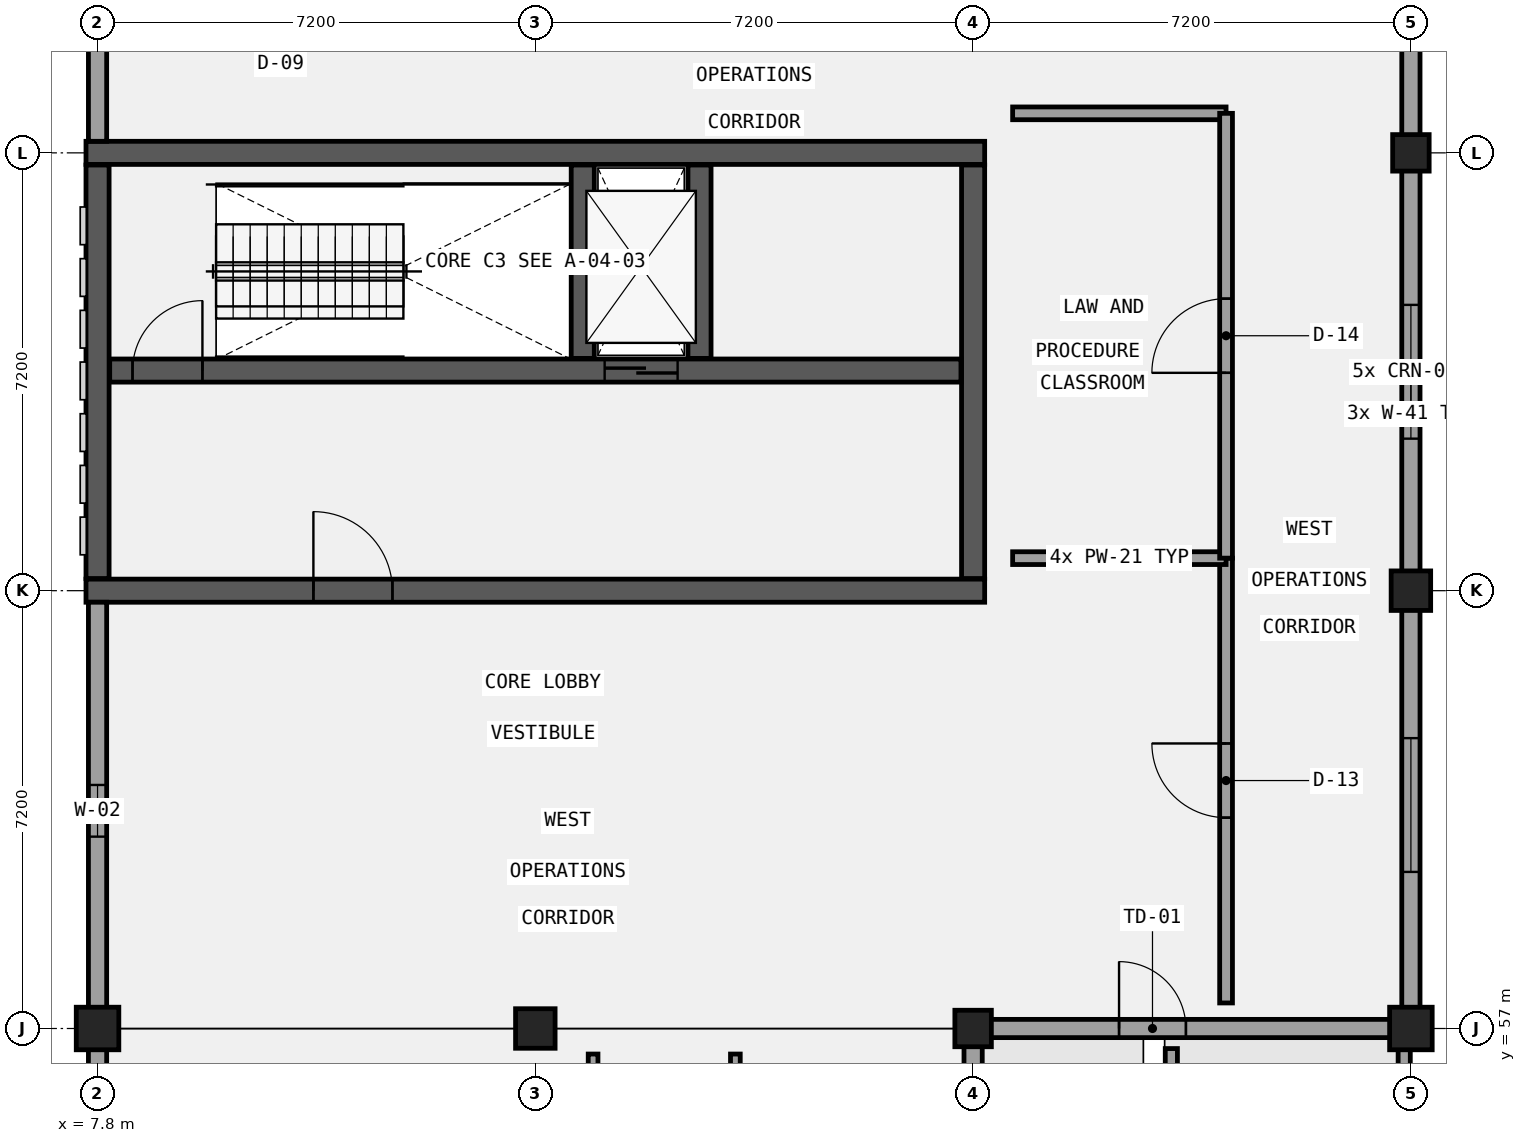
"""IFC4 building model, lengths in metres.
Left out: names, types, materials, properties, quantities, classifications, styles, units other than length and angle.
Written with IfcOpenShell. Run it as: python <this file> out.ifc"""

import sys

from ifc_helpers import new_model, si_unit, direction, frame, frame_2d, origin, origin_2d, place, context, subcontext, project, spatial, rectangle, extrude, element, fill, save


model = new_model("IFC4")
c1 = context("Model", 3, precision=1e-05, world=origin(), true_north=direction((0.0, 1.0)))
c2 = subcontext(c1, "Body", "Model", "MODEL_VIEW")
j1 = project(units=[si_unit("LENGTHUNIT", "METRE"), si_unit("PLANEANGLEUNIT", "RADIAN")], contexts=[c1])
p1 = place(None, origin())
s1 = spatial("IfcSite", under=j1, at=p1, CompositionType="ELEMENT")
p2 = place(p1, origin())
s2 = spatial("IfcBuilding", under=s1, at=p2, CompositionType="ELEMENT")
p3 = place(p2, frame((0.0, 0.0, 13.8)))
s3 = spatial("IfcBuildingStorey", under=s2, at=p3, CompositionType="ELEMENT", Elevation=13.8)
p4 = place(p3, frame((7.61, 71.4, 0.0), z_axis=(0.0, 0.0, 1.0), x_axis=(1.0, 0.0, 0.0)))
e1 = element("IfcWall", 1, at=p4, inside=s3, PredefinedType="SHEAR", context=c2, shape_type="SweptSolid", body=[
    extrude(rectangle(XDim=14.78, YDim=0.38, at=frame_2d((7.39, 0.0))), origin(), (0.0, 0.0, 1.0), 4.2),
])
p5 = place(p3, frame((7.61, 64.2, 0.0), z_axis=(0.0, 0.0, 1.0), x_axis=(1.0, 0.0, 0.0)))
e2 = element("IfcWall", 2, at=p5, inside=s3, PredefinedType="SHEAR", context=c2, shape_type="SweptSolid", body=[
    extrude(rectangle(XDim=14.78, YDim=0.38, at=frame_2d((7.39, 0.0))), origin(), (0.0, 0.0, 1.0), 4.2),
])
p6 = place(p5, frame((3.74, 0.0, 0.0)))
e3 = element("IfcOpeningElement", 3, at=p6, cuts=e2, PredefinedType="OPENING", context=c2, shape_type="SweptSolid", body=[
    extrude(rectangle(XDim=1.3, YDim=2.2, at=frame_2d((0.65, 1.1))), frame((0.0, 0.2, 0.0), z_axis=(0.0, -1.0, 0.0), x_axis=(1.0, 0.0, 0.0)), (0.0, 0.0, 1.0), 0.4),
])
for number, where, z_axis, x_axis in (
    (4, (7.8, 64.4, 0.0), (0.0, 0.0, 1.0), (0.0, 1.0, 0.0)),
    (5, (22.2, 64.4, 0.0), (0.0, 0.0, 1.0), (0.0, 1.0, 0.0)),
):
    element("IfcWall", number, at=place(p3, frame(where, z_axis=z_axis, x_axis=x_axis)), inside=s3, PredefinedType="SHEAR", context=c2, shape_type="SweptSolid", body=[
        extrude(rectangle(XDim=6.8, YDim=0.38, at=frame_2d((3.4, 0.0))), origin(), (0.0, 0.0, 1.0), 4.2),
    ])
p7 = place(p3, frame((8.0, 67.82, 0.0), z_axis=(0.0, 0.0, 1.0), x_axis=(1.0, 0.0, 0.0)))
e6 = element("IfcWall", 6, at=p7, inside=s3, PredefinedType="SHEAR", context=c2, shape_type="SweptSolid", body=[
    extrude(rectangle(XDim=14.0, YDim=0.38, at=frame_2d((7.0, 0.0))), origin(), (0.0, 0.0, 1.0), 4.2),
])
p8 = place(p7, frame((8.14, 0.0, 0.0)))
e7 = element("IfcOpeningElement", 7, at=p8, cuts=e6, PredefinedType="OPENING", context=c2, shape_type="SweptSolid", body=[
    extrude(rectangle(XDim=1.2, YDim=2.15, at=frame_2d((0.6, 1.075))), frame((0.0, 0.2, 0.0), z_axis=(0.0, -1.0, 0.0), x_axis=(1.0, 0.0, 0.0)), (0.0, 0.0, 1.0), 0.4),
])
p9 = place(p7, frame((0.375, 0.0, 0.0)))
e8 = element("IfcOpeningElement", 8, at=p9, cuts=e6, PredefinedType="OPENING", context=c2, shape_type="SweptSolid", body=[
    extrude(rectangle(XDim=1.15, YDim=2.15, at=frame_2d((0.575, 1.075))), frame((0.0, 0.2, 0.0), z_axis=(0.0, -1.0, 0.0), x_axis=(1.0, 0.0, 0.0)), (0.0, 0.0, 1.0), 0.4),
])
for number, where, z_axis, x_axis in (
    (9, (15.78, 68.02, 0.0), (0.0, 0.0, 1.0), (0.0, 1.0, 0.0)),
    (10, (17.7, 68.02, 0.0), (0.0, 0.0, 1.0), (0.0, 1.0, 0.0)),
):
    element("IfcWall", number, at=place(p3, frame(where, z_axis=z_axis, x_axis=x_axis)), inside=s3, PredefinedType="SHEAR", context=c2, shape_type="SweptSolid", body=[
        extrude(rectangle(XDim=3.18, YDim=0.38, at=frame_2d((1.59, 0.0))), origin(), (0.0, 0.0, 1.0), 4.2),
    ])
p10 = place(p3, frame((7.8, 57.0, 0.0), z_axis=(0.0, 0.0, 1.0), x_axis=(1.0, 0.0, 0.0)))
e11 = element("IfcColumn", 11, at=p10, inside=s3, PredefinedType="COLUMN", context=c2, shape_type="SweptSolid", body=[
    extrude(rectangle(XDim=0.7, YDim=0.7, at=origin_2d()), origin(), (0.0, 0.0, 1.0), 4.2),
])
p11 = place(p3, frame((15.0, 57.0, 0.0), z_axis=(0.0, 0.0, 1.0), x_axis=(1.0, 0.0, 0.0)))
e12 = element("IfcColumn", 12, at=p11, inside=s3, PredefinedType="COLUMN", context=c2, shape_type="SweptSolid", body=[
    extrude(rectangle(XDim=0.65, YDim=0.65, at=origin_2d()), origin(), (0.0, 0.0, 1.0), 4.2),
])
p12 = place(p3, frame((22.2, 57.0, 0.0), z_axis=(0.0, 0.0, 1.0), x_axis=(1.0, 0.0, 0.0)))
e13 = element("IfcColumn", 13, at=p12, inside=s3, PredefinedType="COLUMN", context=c2, shape_type="SweptSolid", body=[
    extrude(rectangle(XDim=0.6, YDim=0.6, at=origin_2d()), origin(), (0.0, 0.0, 1.0), 4.2),
])
p13 = place(p3, frame((29.4, 57.0, 0.0), z_axis=(0.0, 0.0, 1.0), x_axis=(1.0, 0.0, 0.0)))
e14 = element("IfcColumn", 14, at=p13, inside=s3, PredefinedType="COLUMN", context=c2, shape_type="SweptSolid", body=[
    extrude(rectangle(XDim=0.7, YDim=0.7, at=origin_2d()), origin(), (0.0, 0.0, 1.0), 4.2),
])
p14 = place(p3, frame((29.4, 64.2, 0.0), z_axis=(0.0, 0.0, 1.0), x_axis=(1.0, 0.0, 0.0)))
e15 = element("IfcColumn", 15, at=p14, inside=s3, PredefinedType="COLUMN", context=c2, shape_type="SweptSolid", body=[
    extrude(rectangle(XDim=0.65, YDim=0.65, at=origin_2d()), origin(), (0.0, 0.0, 1.0), 4.2),
])
p15 = place(p3, frame((29.4, 71.4, 0.0), z_axis=(0.0, 0.0, 1.0), x_axis=(1.0, 0.0, 0.0)))
e16 = element("IfcColumn", 16, at=p15, inside=s3, PredefinedType="COLUMN", context=c2, shape_type="SweptSolid", body=[
    extrude(rectangle(XDim=0.6, YDim=0.6, at=origin_2d()), origin(), (0.0, 0.0, 1.0), 4.2),
])
p16 = place(p3, frame((22.2, 28.35, 0.0), z_axis=(0.0, 0.0, 1.0), x_axis=(0.0, 1.0, 0.0)))
e17 = element("IfcWall", 17, at=p16, inside=s3, PredefinedType="SOLIDWALL", context=c2, shape_type="SweptSolid", body=[
    extrude(rectangle(XDim=28.5, YDim=0.3, at=frame_2d((14.25, 0.0))), origin(), (0.0, 0.0, 1.0), 2.94),
])
p17 = place(p16, frame((17.1, 0.0, 0.0)))
e18 = element("IfcOpeningElement", 18, at=p17, cuts=e17, PredefinedType="OPENING", context=c2, shape_type="SweptSolid", body=[
    extrude(rectangle(XDim=1.1, YDim=2.2, at=frame_2d((0.55, 1.1))), frame((0.0, 0.16, 0.0), z_axis=(0.0, -1.0, 0.0), x_axis=(1.0, 0.0, 0.0)), (0.0, 0.0, 1.0), 0.32),
])
p18 = place(p16, frame((2.95, 0.0, 1.0)))
e19 = element("IfcOpeningElement", 19, at=p18, cuts=e17, PredefinedType="OPENING", context=c2, shape_type="SweptSolid", body=[
    extrude(rectangle(XDim=1.15, YDim=1.4, at=frame_2d((0.575, 0.7))), frame((0.0, 0.16, 0.0), z_axis=(0.0, -1.0, 0.0), x_axis=(1.0, 0.0, 0.0)), (0.0, 0.0, 1.0), 0.32),
])
p19 = place(p16, frame((10.075, 0.0, 1.0)))
e20 = element("IfcOpeningElement", 20, at=p19, cuts=e17, PredefinedType="OPENING", context=c2, shape_type="SweptSolid", body=[
    extrude(rectangle(XDim=1.15, YDim=1.4, at=frame_2d((0.575, 0.7))), frame((0.0, 0.16, 0.0), z_axis=(0.0, -1.0, 0.0), x_axis=(1.0, 0.0, 0.0)), (0.0, 0.0, 1.0), 0.32),
])
p20 = place(p16, frame((24.4, 0.0, 1.0)))
e21 = element("IfcOpeningElement", 21, at=p20, cuts=e17, PredefinedType="OPENING", context=c2, shape_type="SweptSolid", body=[
    extrude(rectangle(XDim=1.15, YDim=1.4, at=frame_2d((0.575, 0.7))), frame((0.0, 0.16, 0.0), z_axis=(0.0, -1.0, 0.0), x_axis=(1.0, 0.0, 0.0)), (0.0, 0.0, 1.0), 0.32),
])
p21 = place(p3, frame((22.05, 57.0, 0.0), z_axis=(0.0, 0.0, 1.0), x_axis=(1.0, 0.0, 0.0)))
e22 = element("IfcWall", 22, at=p21, inside=s3, PredefinedType="SOLIDWALL", context=c2, shape_type="SweptSolid", body=[
    extrude(rectangle(XDim=7.5, YDim=0.3, at=frame_2d((3.75, 0.0))), origin(), (0.0, 0.0, 1.0), 3.04),
])
p22 = place(p21, frame((2.55, 0.0, 0.0)))
e23 = element("IfcOpeningElement", 23, at=p22, cuts=e22, PredefinedType="OPENING", context=c2, shape_type="SweptSolid", body=[
    extrude(rectangle(XDim=1.1, YDim=2.2, at=frame_2d((0.55, 1.1))), frame((0.0, 0.16, 0.0), z_axis=(0.0, -1.0, 0.0), x_axis=(1.0, 0.0, 0.0)), (0.0, 0.0, 1.0), 0.32),
])
p23 = place(p3, frame((29.4, 57.15, 0.0), z_axis=(0.0, 0.0, 1.0), x_axis=(0.0, 1.0, 0.0)))
e24 = element("IfcWall", 24, at=p23, inside=s3, PredefinedType="SOLIDWALL", context=c2, shape_type="SweptSolid", body=[
    extrude(rectangle(XDim=21.3, YDim=0.3, at=frame_2d((10.65, 0.0))), origin(), (0.0, 0.0, 1.0), 3.19),
])
p24 = place(p23, frame((2.425, 0.0, 1.0)))
e25 = element("IfcOpeningElement", 25, at=p24, cuts=e24, PredefinedType="OPENING", context=c2, shape_type="SweptSolid", body=[
    extrude(rectangle(XDim=2.2, YDim=1.4, at=frame_2d((1.1, 0.7))), frame((0.0, 0.16, 0.0), z_axis=(0.0, -1.0, 0.0), x_axis=(1.0, 0.0, 0.0)), (0.0, 0.0, 1.0), 0.32),
])
p25 = place(p23, frame((9.55, 0.0, 1.0)))
e26 = element("IfcOpeningElement", 26, at=p25, cuts=e24, PredefinedType="OPENING", context=c2, shape_type="SweptSolid", body=[
    extrude(rectangle(XDim=2.2, YDim=1.4, at=frame_2d((1.1, 0.7))), frame((0.0, 0.16, 0.0), z_axis=(0.0, -1.0, 0.0), x_axis=(1.0, 0.0, 0.0)), (0.0, 0.0, 1.0), 0.32),
])
p26 = place(p23, frame((16.675, 0.0, 1.0)))
e27 = element("IfcOpeningElement", 27, at=p26, cuts=e24, PredefinedType="OPENING", context=c2, shape_type="SweptSolid", body=[
    extrude(rectangle(XDim=2.2, YDim=1.4, at=frame_2d((1.1, 0.7))), frame((0.0, 0.16, 0.0), z_axis=(0.0, -1.0, 0.0), x_axis=(1.0, 0.0, 0.0)), (0.0, 0.0, 1.0), 0.32),
])
p27 = place(p3, frame((7.8, 78.45, 0.0), z_axis=(0.0, 0.0, 1.0), x_axis=(0.0, -1.0, 0.0)))
e28 = element("IfcWall", 28, at=p27, inside=s3, PredefinedType="SOLIDWALL", context=c2, shape_type="SweptSolid", body=[
    extrude(rectangle(XDim=6.86, YDim=0.3, at=frame_2d((3.43, 0.0))), origin(), (0.0, 0.0, 1.0), 3.34),
])
p28 = place(p27, frame((2.78, 0.0, 1.0)))
e29 = element("IfcOpeningElement", 29, at=p28, cuts=e28, PredefinedType="OPENING", context=c2, shape_type="SweptSolid", body=[
    extrude(rectangle(XDim=1.3, YDim=1.65, at=frame_2d((0.65, 0.825))), frame((0.0, 0.16, 0.0), z_axis=(0.0, -1.0, 0.0), x_axis=(1.0, 0.0, 0.0)), (0.0, 0.0, 1.0), 0.32),
])
p29 = place(p3, frame((7.8, 64.01, 0.0), z_axis=(0.0, 0.0, 1.0), x_axis=(0.0, -1.0, 0.0)))
e30 = element("IfcWall", 30, at=p29, inside=s3, PredefinedType="SOLIDWALL", context=c2, shape_type="SweptSolid", body=[
    extrude(rectangle(XDim=6.86, YDim=0.3, at=frame_2d((3.43, 0.0))), origin(), (0.0, 0.0, 1.0), 2.94),
])
p30 = place(p29, frame((3.005, 0.0, 1.0)))
e31 = element("IfcOpeningElement", 31, at=p30, cuts=e30, PredefinedType="OPENING", context=c2, shape_type="SweptSolid", body=[
    extrude(rectangle(XDim=0.85, YDim=1.65, at=frame_2d((0.425, 0.825))), frame((0.0, 0.16, 0.0), z_axis=(0.0, -1.0, 0.0), x_axis=(1.0, 0.0, 0.0)), (0.0, 0.0, 1.0), 0.32),
])
p31 = place(p3, frame((7.8, 56.85, 0.0), z_axis=(0.0, 0.0, 1.0), x_axis=(0.0, -1.0, 0.0)))
e32 = element("IfcWall", 32, at=p31, inside=s3, PredefinedType="SOLIDWALL", context=c2, shape_type="SweptSolid", body=[
    extrude(rectangle(XDim=28.5, YDim=0.3, at=frame_2d((14.25, 0.0))), origin(), (0.0, 0.0, 1.0), 3.04),
])
p32 = place(p31, frame((24.475, 0.0, 1.0)))
e33 = element("IfcOpeningElement", 33, at=p32, cuts=e32, PredefinedType="OPENING", context=c2, shape_type="SweptSolid", body=[
    extrude(rectangle(XDim=1.0, YDim=1.4, at=frame_2d((0.5, 0.7))), frame((0.0, 0.16, 0.0), z_axis=(0.0, -1.0, 0.0), x_axis=(1.0, 0.0, 0.0)), (0.0, 0.0, 1.0), 0.32),
])
p33 = place(p31, frame((17.35, 0.0, 1.0)))
e34 = element("IfcOpeningElement", 34, at=p33, cuts=e32, PredefinedType="OPENING", context=c2, shape_type="SweptSolid", body=[
    extrude(rectangle(XDim=1.0, YDim=1.4, at=frame_2d((0.5, 0.7))), frame((0.0, 0.16, 0.0), z_axis=(0.0, -1.0, 0.0), x_axis=(1.0, 0.0, 0.0)), (0.0, 0.0, 1.0), 0.32),
])
p34 = place(p31, frame((10.15, 0.0, 1.0)))
e35 = element("IfcOpeningElement", 35, at=p34, cuts=e32, PredefinedType="OPENING", context=c2, shape_type="SweptSolid", body=[
    extrude(rectangle(XDim=1.0, YDim=1.4, at=frame_2d((0.5, 0.7))), frame((0.0, 0.16, 0.0), z_axis=(0.0, -1.0, 0.0), x_axis=(1.0, 0.0, 0.0)), (0.0, 0.0, 1.0), 0.32),
])
p35 = place(p31, frame((3.025, 0.0, 1.0)))
e36 = element("IfcOpeningElement", 36, at=p35, cuts=e32, PredefinedType="OPENING", context=c2, shape_type="SweptSolid", body=[
    extrude(rectangle(XDim=1.0, YDim=1.4, at=frame_2d((0.5, 0.7))), frame((0.0, 0.16, 0.0), z_axis=(0.0, -1.0, 0.0), x_axis=(1.0, 0.0, 0.0)), (0.0, 0.0, 1.0), 0.32),
])
for number, where, z_axis, x_axis in (
    (37, (25.46, 35.51, 0.0), (0.0, 0.0, 1.0), (0.0, 1.0, 0.0)),
    (38, (29.29, 56.67, 0.0), (0.0, 0.0, 1.0), (0.0, -1.0, 0.0)),
):
    element("IfcWall", number, at=place(p3, frame(where, z_axis=z_axis, x_axis=x_axis)), inside=s3, PredefinedType="PARAPET", context=c2, shape_type="SweptSolid", body=[
        extrude(rectangle(XDim=21.16, YDim=0.2, at=frame_2d((10.58, 0.0))), origin(), (0.0, 0.0, 1.0), 1.12),
    ])
p36 = place(p3, frame((15.95, 48.11, 0.0), z_axis=(0.0, 0.0, 1.0), x_axis=(0.0, 1.0, 0.0)))
e39 = element("IfcWall", 39, at=p36, inside=s3, PredefinedType="PARTITIONING", context=c2, shape_type="SweptSolid", body=[
    extrude(rectangle(XDim=8.47, YDim=0.16, at=frame_2d((4.235, 0.0))), origin(), (0.0, 0.0, 1.0), 3.94),
])
p37 = place(p36, frame((3.745, 0.0, 0.0)))
e40 = element("IfcOpeningElement", 40, at=p37, cuts=e39, PredefinedType="OPENING", context=c2, shape_type="SweptSolid", body=[
    extrude(rectangle(XDim=0.98, YDim=2.1, at=frame_2d((0.49, 1.05))), frame((0.0, 0.09, 0.0), z_axis=(0.0, -1.0, 0.0), x_axis=(1.0, 0.0, 0.0)), (0.0, 0.0, 1.0), 0.18),
])
p38 = place(p3, frame((18.29, 50.988, 0.0), z_axis=(0.0, 0.0, 1.0), x_axis=(0.0, 1.0, 0.0)))
e41 = element("IfcWall", 41, at=p38, inside=s3, PredefinedType="PARTITIONING", context=c2, shape_type="SweptSolid", body=[
    extrude(rectangle(XDim=5.592, YDim=0.16, at=frame_2d((2.796, 0.0))), origin(), (0.0, 0.0, 1.0), 3.94),
])
p39 = place(p38, frame((2.276, 0.0, 0.0)))
e42 = element("IfcOpeningElement", 42, at=p39, cuts=e41, PredefinedType="OPENING", context=c2, shape_type="SweptSolid", body=[
    extrude(rectangle(XDim=1.04, YDim=2.22, at=frame_2d((0.52, 1.11))), frame((0.0, 0.09, 0.0), z_axis=(0.0, -1.0, 0.0), x_axis=(1.0, 0.0, 0.0)), (0.0, 0.0, 1.0), 0.18),
])
p40 = place(p3, frame((22.85, 72.05, 0.0), z_axis=(0.0, 0.0, 1.0), x_axis=(1.0, 0.0, 0.0)))
e43 = element("IfcWall", 43, at=p40, inside=s3, PredefinedType="PARTITIONING", context=c2, shape_type="SweptSolid", body=[
    extrude(rectangle(XDim=3.51, YDim=0.21, at=frame_2d((1.755, 0.0))), origin(), (0.0, 0.0, 1.0), 3.94),
])
p41 = place(p3, frame((26.36, 57.42, 0.0), z_axis=(0.0, 0.0, 1.0), x_axis=(0.0, 1.0, 0.0)))
e44 = element("IfcWall", 44, at=p41, inside=s3, PredefinedType="PARTITIONING", context=c2, shape_type="SweptSolid", body=[
    extrude(rectangle(XDim=7.315, YDim=0.21, at=frame_2d((3.658, 0.0))), origin(), (0.0, 0.0, 1.0), 3.94),
])
p42 = place(p41, frame((3.048, 0.0, 0.0)))
e45 = element("IfcOpeningElement", 45, at=p42, cuts=e44, PredefinedType="OPENING", context=c2, shape_type="SweptSolid", body=[
    extrude(rectangle(XDim=1.22, YDim=2.1, at=frame_2d((0.61, 1.05))), frame((0.0, 0.115, 0.0), z_axis=(0.0, -1.0, 0.0), x_axis=(1.0, 0.0, 0.0)), (0.0, 0.0, 1.0), 0.23),
])
p43 = place(p3, frame((22.85, 64.735, 0.0), z_axis=(0.0, 0.0, 1.0), x_axis=(1.0, 0.0, 0.0)))
e46 = element("IfcWall", 46, at=p43, inside=s3, PredefinedType="PARTITIONING", context=c2, shape_type="SweptSolid", body=[
    extrude(rectangle(XDim=3.51, YDim=0.21, at=frame_2d((1.755, 0.0))), origin(), (0.0, 0.0, 1.0), 3.94),
])
p44 = place(p3, frame((26.36, 64.735, 0.0), z_axis=(0.0, 0.0, 1.0), x_axis=(0.0, 1.0, 0.0)))
e47 = element("IfcWall", 47, at=p44, inside=s3, PredefinedType="PARTITIONING", context=c2, shape_type="SweptSolid", body=[
    extrude(rectangle(XDim=7.315, YDim=0.21, at=frame_2d((3.657, 0.0))), origin(), (0.0, 0.0, 1.0), 3.94),
])
p45 = place(p44, frame((3.048, 0.0, 0.0)))
e48 = element("IfcOpeningElement", 48, at=p45, cuts=e47, PredefinedType="OPENING", context=c2, shape_type="SweptSolid", body=[
    extrude(rectangle(XDim=1.22, YDim=2.22, at=frame_2d((0.61, 1.11))), frame((0.0, 0.115, 0.0), z_axis=(0.0, -1.0, 0.0), x_axis=(1.0, 0.0, 0.0)), (0.0, 0.0, 1.0), 0.23),
])
p46 = place(p8, frame((1.2, 0.0, 0.0), z_axis=(0.0, 0.0, 1.0), x_axis=(-1.0, 0.0, 0.0)))
e49 = element("IfcDoor", 49, at=p46, inside=s3, OperationType="DOUBLE_DOOR_SLIDING", PredefinedType="DOOR", context=c2, shape_type="SweptSolid", body=[
    extrude(rectangle(XDim=1.2, YDim=2.15, at=frame_2d((0.6, 1.075))), frame((0.0, 0.025, 0.0), z_axis=(0.0, -1.0, 0.0), x_axis=(1.0, 0.0, 0.0)), (0.0, 0.0, 1.0), 0.05),
])
fill(e7, e49)
p47 = place(p9, origin())
e50 = element("IfcDoor", 50, at=p47, inside=s3, OperationType="SINGLE_SWING_RIGHT", PredefinedType="DOOR", context=c2, shape_type="SweptSolid", body=[
    extrude(rectangle(XDim=1.15, YDim=2.15, at=frame_2d((0.575, 1.075))), frame((0.0, 0.025, 0.0), z_axis=(0.0, -1.0, 0.0), x_axis=(1.0, 0.0, 0.0)), (0.0, 0.0, 1.0), 0.05),
])
fill(e8, e50)
p48 = place(p6, frame((1.3, 0.0, 0.0), z_axis=(0.0, 0.0, 1.0), x_axis=(-1.0, 0.0, 0.0)))
e51 = element("IfcDoor", 51, at=p48, inside=s3, OperationType="SINGLE_SWING_LEFT", PredefinedType="DOOR", context=c2, shape_type="SweptSolid", body=[
    extrude(rectangle(XDim=1.3, YDim=2.2, at=frame_2d((0.65, 1.1))), frame((0.0, 0.025, 0.0), z_axis=(0.0, -1.0, 0.0), x_axis=(1.0, 0.0, 0.0)), (0.0, 0.0, 1.0), 0.05),
])
fill(e3, e51)
p49 = place(p22, frame((1.1, 0.0, 0.0), z_axis=(0.0, 0.0, 1.0), x_axis=(-1.0, 0.0, 0.0)))
e52 = element("IfcDoor", 52, at=p49, inside=s3, OperationType="SINGLE_SWING_LEFT", PredefinedType="DOOR", context=c2, shape_type="SweptSolid", body=[
    extrude(rectangle(XDim=1.1, YDim=2.2, at=frame_2d((0.55, 1.1))), frame((0.0, 0.025, 0.0), z_axis=(0.0, -1.0, 0.0), x_axis=(1.0, 0.0, 0.0)), (0.0, 0.0, 1.0), 0.05),
])
fill(e23, e52)
p50 = place(p24, origin())
e53 = element("IfcWindow", 53, at=p50, inside=s3, PartitioningType="SINGLE_PANEL", PredefinedType="WINDOW", context=c2, shape_type="SweptSolid", body=[
    extrude(rectangle(XDim=2.2, YDim=1.4, at=frame_2d((1.1, 0.7))), frame((0.0, 0.03, 0.0), z_axis=(0.0, -1.0, 0.0), x_axis=(1.0, 0.0, 0.0)), (0.0, 0.0, 1.0), 0.06),
])
fill(e25, e53)
p51 = place(p25, origin())
e54 = element("IfcWindow", 54, at=p51, inside=s3, PartitioningType="SINGLE_PANEL", PredefinedType="WINDOW", context=c2, shape_type="SweptSolid", body=[
    extrude(rectangle(XDim=2.2, YDim=1.4, at=frame_2d((1.1, 0.7))), frame((0.0, 0.03, 0.0), z_axis=(0.0, -1.0, 0.0), x_axis=(1.0, 0.0, 0.0)), (0.0, 0.0, 1.0), 0.06),
])
fill(e26, e54)
p52 = place(p30, origin())
e55 = element("IfcWindow", 55, at=p52, inside=s3, PartitioningType="SINGLE_PANEL", PredefinedType="WINDOW", context=c2, shape_type="SweptSolid", body=[
    extrude(rectangle(XDim=0.85, YDim=1.65, at=frame_2d((0.425, 0.825))), frame((0.0, 0.03, 0.0), z_axis=(0.0, -1.0, 0.0), x_axis=(1.0, 0.0, 0.0)), (0.0, 0.0, 1.0), 0.06),
])
fill(e31, e55)
p53 = place(p42, frame((1.22, 0.0, 0.0), z_axis=(0.0, 0.0, 1.0), x_axis=(-1.0, 0.0, 0.0)))
e56 = element("IfcDoor", 56, at=p53, inside=s3, OperationType="SINGLE_SWING_RIGHT", PredefinedType="DOOR", context=c2, shape_type="SweptSolid", body=[
    extrude(rectangle(XDim=1.22, YDim=2.1, at=frame_2d((0.61, 1.05))), frame((0.0, 0.025, 0.0), z_axis=(0.0, -1.0, 0.0), x_axis=(1.0, 0.0, 0.0)), (0.0, 0.0, 1.0), 0.05),
])
fill(e45, e56)
p54 = place(p45, frame((1.22, 0.0, 0.0), z_axis=(0.0, 0.0, 1.0), x_axis=(-1.0, 0.0, 0.0)))
e57 = element("IfcDoor", 57, at=p54, inside=s3, OperationType="SINGLE_SWING_LEFT", PredefinedType="DOOR", context=c2, shape_type="SweptSolid", body=[
    extrude(rectangle(XDim=1.22, YDim=2.22, at=frame_2d((0.61, 1.11))), frame((0.0, 0.025, 0.0), z_axis=(0.0, -1.0, 0.0), x_axis=(1.0, 0.0, 0.0)), (0.0, 0.0, 1.0), 0.05),
])
fill(e48, e57)
save(model, sys.argv[1])
